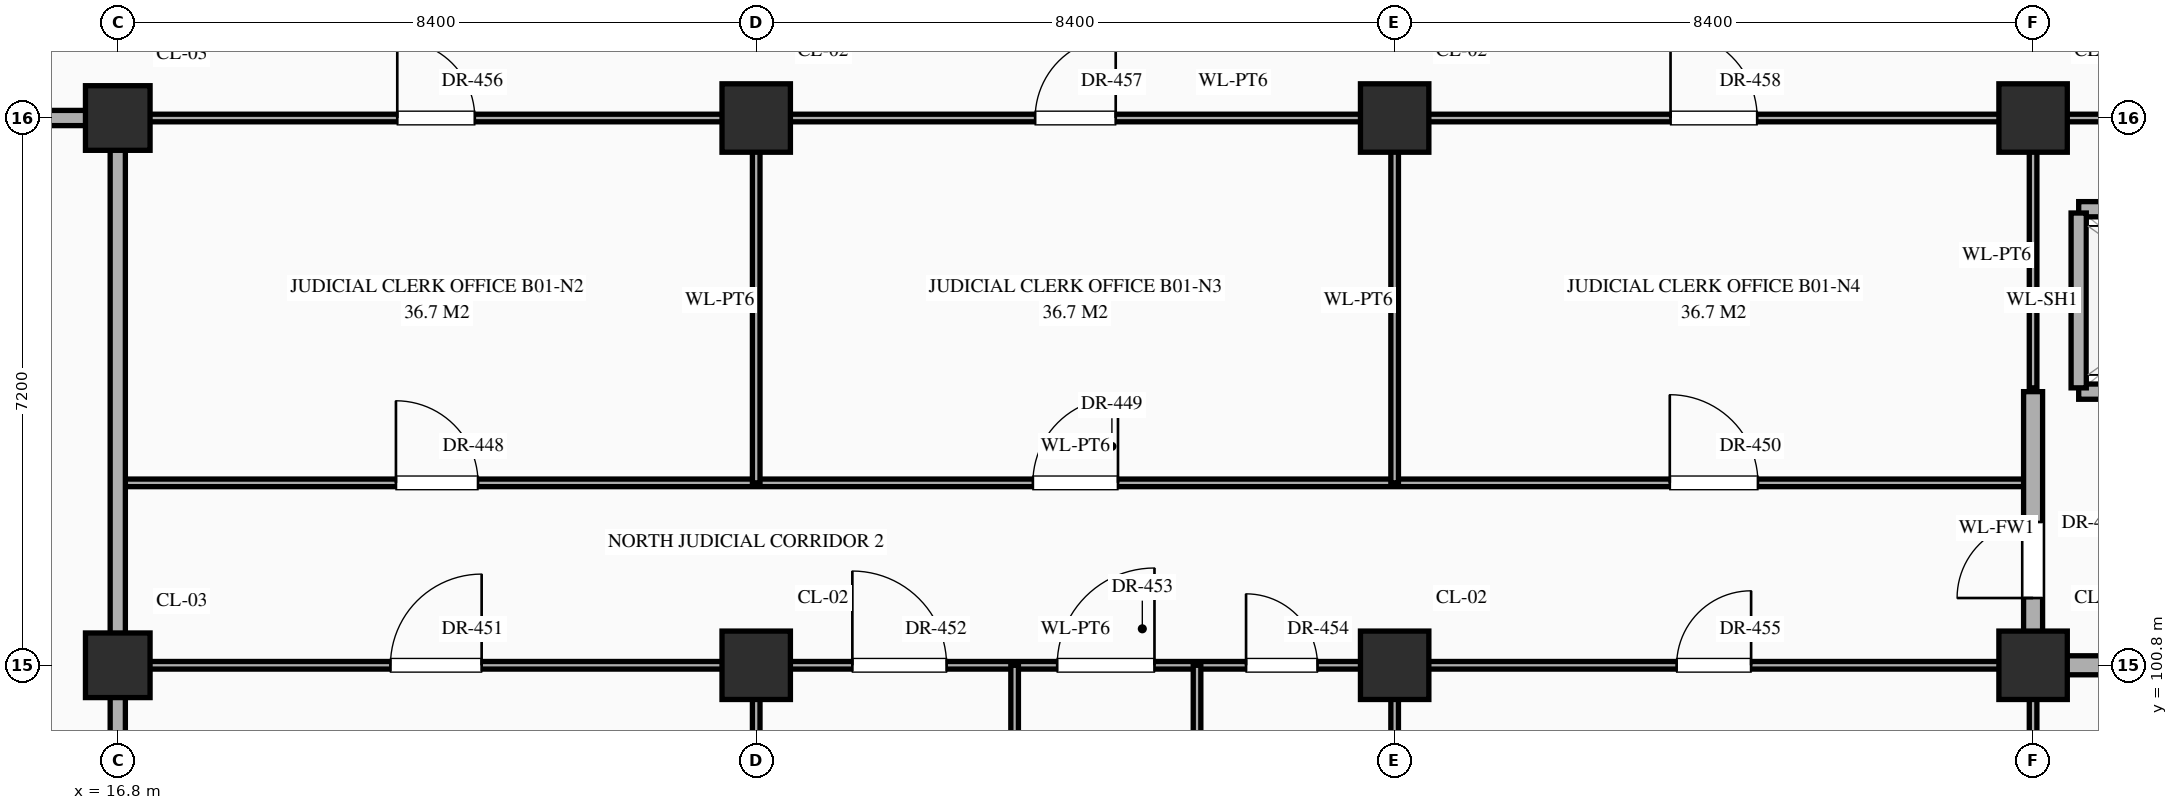
"""IFC4 building model, lengths in metres.
Left out: names, types, materials, properties, quantities, classifications, styles, units other than length and angle.
Written with IfcOpenShell. Run it as: python <this file> out.ifc"""

import sys

from ifc_helpers import new_model, si_unit, direction, frame, frame_2d, origin, origin_2d, place, context, subcontext, project, spatial, rectangle, extrude, element, fill, save


model = new_model("IFC4")
c1 = context("Model", 3, precision=1e-05, world=origin(), true_north=direction((0.0, 1.0)))
c2 = subcontext(c1, "Body", "Model", "MODEL_VIEW")
j1 = project(units=[si_unit("LENGTHUNIT", "METRE"), si_unit("PLANEANGLEUNIT", "RADIAN")], contexts=[c1])
p1 = place(None, origin())
s1 = spatial("IfcSite", under=j1, at=p1, CompositionType="ELEMENT")
p2 = place(p1, origin())
s2 = spatial("IfcBuilding", under=s1, at=p2, CompositionType="ELEMENT")
p3 = place(p2, frame((0.0, 0.0, -5.4)))
s3 = spatial("IfcBuildingStorey", under=s2, at=p3, CompositionType="ELEMENT", Elevation=-5.4)
for number, where, z_axis, x_axis in (
    (1, (16.8, 100.8, 0.0), (0.0, 0.0, 1.0), (1.0, 0.0, 0.0)),
    (2, (16.8, 108.0, 0.0), (0.0, 0.0, 1.0), (1.0, 0.0, 0.0)),
):
    element("IfcColumn", number, at=place(p3, frame(where, z_axis=z_axis, x_axis=x_axis)), inside=s3, PredefinedType="COLUMN", context=c2, shape_type="SweptSolid", body=[
        extrude(rectangle(XDim=0.85, YDim=0.85, at=origin_2d()), origin(), (0.0, 0.0, 1.0), 5.4),
    ])
for number, where, z_axis, x_axis in (
    (3, (25.2, 100.8, 0.0), (0.0, 0.0, 1.0), (1.0, 0.0, 0.0)),
    (4, (25.2, 108.0, 0.0), (0.0, 0.0, 1.0), (1.0, 0.0, 0.0)),
    (5, (33.6, 100.8, 0.0), (0.0, 0.0, 1.0), (1.0, 0.0, 0.0)),
    (6, (33.6, 108.0, 0.0), (0.0, 0.0, 1.0), (1.0, 0.0, 0.0)),
    (7, (42.0, 100.8, 0.0), (0.0, 0.0, 1.0), (1.0, 0.0, 0.0)),
    (8, (42.0, 108.0, 0.0), (0.0, 0.0, 1.0), (1.0, 0.0, 0.0)),
):
    element("IfcColumn", number, at=place(p3, frame(where, z_axis=z_axis, x_axis=x_axis)), inside=s3, PredefinedType="COLUMN", context=c2, shape_type="SweptSolid", body=[
        extrude(rectangle(XDim=0.9, YDim=0.9, at=origin_2d()), origin(), (0.0, 0.0, 1.0), 5.4),
    ])
p4 = place(p3, frame((16.8, 100.8, 0.0), z_axis=(0.0, 0.0, 1.0), x_axis=(1.0, 0.0, 0.0)))
e9 = element("IfcWall", 9, at=p4, inside=s3, PredefinedType="STANDARD", context=c2, shape_type="SweptSolid", body=[
    extrude(rectangle(XDim=25.2, YDim=0.1, at=frame_2d((12.6, 0.0))), origin(), (0.0, 0.0, 1.0), 4.25),
])
p5 = place(p4, frame((3.587, 0.0, 0.0)))
e10 = element("IfcOpeningElement", 10, at=p5, cuts=e9, PredefinedType="OPENING", context=c2, shape_type="SweptSolid", body=[
    extrude(rectangle(XDim=1.2, YDim=2.35, at=frame_2d((0.6, 1.175))), frame((0.0, 0.062, 0.0), z_axis=(0.0, -1.0, 0.0), x_axis=(1.0, 0.0, 0.0)), (0.0, 0.0, 1.0), 0.124),
])
p6 = place(p4, frame((9.665, 0.0, 0.0)))
e11 = element("IfcOpeningElement", 11, at=p6, cuts=e9, PredefinedType="OPENING", context=c2, shape_type="SweptSolid", body=[
    extrude(rectangle(XDim=1.24, YDim=2.3, at=frame_2d((0.62, 1.15))), frame((0.0, 0.062, 0.0), z_axis=(0.0, -1.0, 0.0), x_axis=(1.0, 0.0, 0.0)), (0.0, 0.0, 1.0), 0.124),
])
p7 = place(p4, frame((12.36, 0.0, 0.0)))
e12 = element("IfcOpeningElement", 12, at=p7, cuts=e9, PredefinedType="OPENING", context=c2, shape_type="SweptSolid", body=[
    extrude(rectangle(XDim=1.28, YDim=2.35, at=frame_2d((0.64, 1.175))), frame((0.0, 0.062, 0.0), z_axis=(0.0, -1.0, 0.0), x_axis=(1.0, 0.0, 0.0)), (0.0, 0.0, 1.0), 0.124),
])
p8 = place(p4, frame((14.845, 0.0, 0.0)))
e13 = element("IfcOpeningElement", 13, at=p8, cuts=e9, PredefinedType="OPENING", context=c2, shape_type="SweptSolid", body=[
    extrude(rectangle(XDim=0.94, YDim=2.3, at=frame_2d((0.47, 1.15))), frame((0.0, 0.062, 0.0), z_axis=(0.0, -1.0, 0.0), x_axis=(1.0, 0.0, 0.0)), (0.0, 0.0, 1.0), 0.124),
])
p9 = place(p4, frame((20.51, 0.0, 0.0)))
e14 = element("IfcOpeningElement", 14, at=p9, cuts=e9, PredefinedType="OPENING", context=c2, shape_type="SweptSolid", body=[
    extrude(rectangle(XDim=0.98, YDim=2.35, at=frame_2d((0.49, 1.175))), frame((0.0, 0.062, 0.0), z_axis=(0.0, -1.0, 0.0), x_axis=(1.0, 0.0, 0.0)), (0.0, 0.0, 1.0), 0.124),
])
p10 = place(p3, frame((42.0, 100.8, 0.0), z_axis=(0.0, 0.0, 1.0), x_axis=(1.0, 0.0, 0.0)))
e15 = element("IfcWall", 15, at=p10, inside=s3, PredefinedType="STANDARD", context=c2, shape_type="SweptSolid", body=[
    extrude(rectangle(XDim=4.2, YDim=0.25, at=frame_2d((2.1, 0.0))), origin(), (0.0, 0.0, 1.0), 4.25),
])
p11 = place(p3, frame((16.8, 103.2, 0.0), z_axis=(0.0, 0.0, 1.0), x_axis=(1.0, 0.0, 0.0)))
e16 = element("IfcWall", 16, at=p11, inside=s3, PredefinedType="STANDARD", context=c2, shape_type="SweptSolid", body=[
    extrude(rectangle(XDim=25.2, YDim=0.1, at=frame_2d((12.6, 0.0))), origin(), (0.0, 0.0, 1.0), 5.1),
])
p12 = place(p11, frame((3.66, 0.0, 0.0)))
e17 = element("IfcOpeningElement", 17, at=p12, cuts=e16, PredefinedType="OPENING", context=c2, shape_type="SweptSolid", body=[
    extrude(rectangle(XDim=1.08, YDim=2.25, at=frame_2d((0.54, 1.125))), frame((0.0, 0.062, 0.0), z_axis=(0.0, -1.0, 0.0), x_axis=(1.0, 0.0, 0.0)), (0.0, 0.0, 1.0), 0.124),
])
p13 = place(p11, frame((12.04, 0.0, 0.0)))
e18 = element("IfcOpeningElement", 18, at=p13, cuts=e16, PredefinedType="OPENING", context=c2, shape_type="SweptSolid", body=[
    extrude(rectangle(XDim=1.12, YDim=2.25, at=frame_2d((0.56, 1.125))), frame((0.0, 0.062, 0.0), z_axis=(0.0, -1.0, 0.0), x_axis=(1.0, 0.0, 0.0)), (0.0, 0.0, 1.0), 0.124),
])
p14 = place(p11, frame((20.42, 0.0, 0.0)))
e19 = element("IfcOpeningElement", 19, at=p14, cuts=e16, PredefinedType="OPENING", context=c2, shape_type="SweptSolid", body=[
    extrude(rectangle(XDim=1.16, YDim=2.3, at=frame_2d((0.58, 1.15))), frame((0.0, 0.062, 0.0), z_axis=(0.0, -1.0, 0.0), x_axis=(1.0, 0.0, 0.0)), (0.0, 0.0, 1.0), 0.124),
])
p15 = place(p3, frame((42.6, 104.4, 0.0), z_axis=(0.0, 0.0, 1.0), x_axis=(1.0, 0.0, 0.0)))
e20 = element("IfcWall", 20, at=p15, inside=s3, PredefinedType="STANDARD", context=c2, shape_type="SweptSolid", body=[
    extrude(rectangle(XDim=3.0, YDim=0.2, at=frame_2d((1.5, 0.0))), origin(), (0.0, 0.0, 1.0), 5.1),
])
p16 = place(p15, frame((0.9, 0.0, 0.0)))
e21 = element("IfcOpeningElement", 21, at=p16, cuts=e20, PredefinedType="OPENING", context=c2, shape_type="SweptSolid", body=[
    extrude(rectangle(XDim=1.2, YDim=2.15, at=frame_2d((0.6, 1.075))), frame((0.0, 0.112, 0.0), z_axis=(0.0, -1.0, 0.0), x_axis=(1.0, 0.0, 0.0)), (0.0, 0.0, 1.0), 0.224),
])
p17 = place(p3, frame((42.6, 106.8, 0.0), z_axis=(0.0, 0.0, 1.0), x_axis=(1.0, 0.0, 0.0)))
e22 = element("IfcWall", 22, at=p17, inside=s3, PredefinedType="STANDARD", context=c2, shape_type="SweptSolid", body=[
    extrude(rectangle(XDim=3.0, YDim=0.2, at=frame_2d((1.5, 0.0))), origin(), (0.0, 0.0, 1.0), 5.1),
])
p18 = place(p3, frame((10.2, 108.0, 0.0), z_axis=(0.0, 0.0, 1.0), x_axis=(1.0, 0.0, 0.0)))
e23 = element("IfcWall", 23, at=p18, inside=s3, PredefinedType="STANDARD", context=c2, shape_type="SweptSolid", body=[
    extrude(rectangle(XDim=6.6, YDim=0.2, at=frame_2d((3.3, 0.0))), origin(), (0.0, 0.0, 1.0), 4.13),
])
p19 = place(p3, frame((16.8, 108.0, 0.0), z_axis=(0.0, 0.0, 1.0), x_axis=(1.0, 0.0, 0.0)))
e24 = element("IfcWall", 24, at=p19, inside=s3, PredefinedType="STANDARD", context=c2, shape_type="SweptSolid", body=[
    extrude(rectangle(XDim=25.2, YDim=0.1, at=frame_2d((12.6, 0.0))), origin(), (0.0, 0.0, 1.0), 4.13),
])
p20 = place(p19, frame((3.677, 0.0, 0.0)))
e25 = element("IfcOpeningElement", 25, at=p20, cuts=e24, PredefinedType="OPENING", context=c2, shape_type="SweptSolid", body=[
    extrude(rectangle(XDim=1.02, YDim=2.4, at=frame_2d((0.51, 1.2))), frame((0.0, 0.062, 0.0), z_axis=(0.0, -1.0, 0.0), x_axis=(1.0, 0.0, 0.0)), (0.0, 0.0, 1.0), 0.124),
])
p21 = place(p19, frame((12.07, 0.0, 0.0)))
e26 = element("IfcOpeningElement", 26, at=p21, cuts=e24, PredefinedType="OPENING", context=c2, shape_type="SweptSolid", body=[
    extrude(rectangle(XDim=1.06, YDim=2.4, at=frame_2d((0.53, 1.2))), frame((0.0, 0.062, 0.0), z_axis=(0.0, -1.0, 0.0), x_axis=(1.0, 0.0, 0.0)), (0.0, 0.0, 1.0), 0.124),
])
p22 = place(p19, frame((20.43, 0.0, 0.0)))
e27 = element("IfcOpeningElement", 27, at=p22, cuts=e24, PredefinedType="OPENING", context=c2, shape_type="SweptSolid", body=[
    extrude(rectangle(XDim=1.14, YDim=2.4, at=frame_2d((0.57, 1.2))), frame((0.0, 0.062, 0.0), z_axis=(0.0, -1.0, 0.0), x_axis=(1.0, 0.0, 0.0)), (0.0, 0.0, 1.0), 0.124),
])
p23 = place(p3, frame((42.05, 108.0, 0.0), z_axis=(0.0, 0.0, 1.0), x_axis=(1.0, 0.0, 0.0)))
e28 = element("IfcWall", 28, at=p23, inside=s3, PredefinedType="STANDARD", context=c2, shape_type="SweptSolid", body=[
    extrude(rectangle(XDim=4.1, YDim=0.1, at=frame_2d((2.05, 0.0))), origin(), (0.0, 0.0, 1.0), 4.13),
])
p24 = place(p3, frame((16.8, 91.2, 0.0), z_axis=(0.0, 0.0, 1.0), x_axis=(0.0, 1.0, 0.0)))
e29 = element("IfcWall", 29, at=p24, inside=s3, PredefinedType="STANDARD", context=c2, shape_type="SweptSolid", body=[
    extrude(rectangle(XDim=16.8, YDim=0.2, at=frame_2d((8.4, 0.0))), origin(), (0.0, 0.0, 1.0), 4.35),
])
for number, where, z_axis, x_axis in (
    (30, (25.2, 96.0, 0.0), (0.0, 0.0, 1.0), (0.0, 1.0, 0.0)),
    (31, (25.2, 103.2, 0.0), (0.0, 0.0, 1.0), (0.0, 1.0, 0.0)),
):
    element("IfcWall", number, at=place(p3, frame(where, z_axis=z_axis, x_axis=x_axis)), inside=s3, PredefinedType="STANDARD", context=c2, shape_type="SweptSolid", body=[
        extrude(rectangle(XDim=4.8, YDim=0.1, at=frame_2d((2.4, 0.0))), origin(), (0.0, 0.0, 1.0), 4.35),
    ])
p25 = place(p3, frame((28.6, 96.0, 0.0), z_axis=(0.0, 0.0, 1.0), x_axis=(0.0, 1.0, 0.0)))
e32 = element("IfcWall", 32, at=p25, inside=s3, PredefinedType="STANDARD", context=c2, shape_type="SweptSolid", body=[
    extrude(rectangle(XDim=4.8, YDim=0.1, at=frame_2d((2.4, 0.0))), origin(), (0.0, 0.0, 1.0), 5.1),
])
p26 = place(p25, frame((1.91, 0.0, 0.0)))
e33 = element("IfcOpeningElement", 33, at=p26, cuts=e32, PredefinedType="OPENING", context=c2, shape_type="SweptSolid", body=[
    extrude(rectangle(XDim=0.98, YDim=2.35, at=frame_2d((0.49, 1.175))), frame((0.0, 0.062, 0.0), z_axis=(0.0, -1.0, 0.0), x_axis=(1.0, 0.0, 0.0)), (0.0, 0.0, 1.0), 0.124),
])
p27 = place(p3, frame((31.0, 96.0, 0.0), z_axis=(0.0, 0.0, 1.0), x_axis=(0.0, 1.0, 0.0)))
e34 = element("IfcWall", 34, at=p27, inside=s3, PredefinedType="STANDARD", context=c2, shape_type="SweptSolid", body=[
    extrude(rectangle(XDim=4.8, YDim=0.1, at=frame_2d((2.4, 0.0))), origin(), (0.0, 0.0, 1.0), 5.1),
])
p28 = place(p27, frame((1.89, 0.0, 0.0)))
e35 = element("IfcOpeningElement", 35, at=p28, cuts=e34, PredefinedType="OPENING", context=c2, shape_type="SweptSolid", body=[
    extrude(rectangle(XDim=1.02, YDim=2.4, at=frame_2d((0.51, 1.2))), frame((0.0, 0.062, 0.0), z_axis=(0.0, -1.0, 0.0), x_axis=(1.0, 0.0, 0.0)), (0.0, 0.0, 1.0), 0.124),
])
for number, where, z_axis, x_axis in (
    (36, (33.6, 96.0, 0.0), (0.0, 0.0, 1.0), (0.0, 1.0, 0.0)),
    (37, (33.6, 103.2, 0.0), (0.0, 0.0, 1.0), (0.0, 1.0, 0.0)),
    (38, (42.0, 96.0, 0.0), (0.0, 0.0, 1.0), (0.0, 1.0, 0.0)),
):
    element("IfcWall", number, at=place(p3, frame(where, z_axis=z_axis, x_axis=x_axis)), inside=s3, PredefinedType="STANDARD", context=c2, shape_type="SweptSolid", body=[
        extrude(rectangle(XDim=4.8, YDim=0.1, at=frame_2d((2.4, 0.0))), origin(), (0.0, 0.0, 1.0), 4.35),
    ])
p29 = place(p3, frame((42.0, 100.8, 0.0), z_axis=(0.0, 0.0, 1.0), x_axis=(0.0, 1.0, 0.0)))
e39 = element("IfcWall", 39, at=p29, inside=s3, PredefinedType="STANDARD", context=c2, shape_type="SweptSolid", body=[
    extrude(rectangle(XDim=3.6, YDim=0.25, at=frame_2d((1.8, 0.0))), origin(), (0.0, 0.0, 1.0), 4.35),
])
p30 = place(p29, frame((0.885, 0.0, 0.0)))
e40 = element("IfcOpeningElement", 40, at=p30, cuts=e39, PredefinedType="OPENING", context=c2, shape_type="SweptSolid", body=[
    extrude(rectangle(XDim=1.0, YDim=2.2, at=frame_2d((0.5, 1.1))), frame((0.0, 0.137, 0.0), z_axis=(0.0, -1.0, 0.0), x_axis=(1.0, 0.0, 0.0)), (0.0, 0.0, 1.0), 0.274),
])
p31 = place(p3, frame((42.0, 104.45, 0.0), z_axis=(0.0, 0.0, 1.0), x_axis=(0.0, 1.0, 0.0)))
e41 = element("IfcWall", 41, at=p31, inside=s3, PredefinedType="STANDARD", context=c2, shape_type="SweptSolid", body=[
    extrude(rectangle(XDim=3.5, YDim=0.1, at=frame_2d((1.75, 0.0))), origin(), (0.0, 0.0, 1.0), 4.35),
])
p32 = place(p3, frame((42.6, 104.45, 0.0), z_axis=(0.0, 0.0, 1.0), x_axis=(0.0, 1.0, 0.0)))
e42 = element("IfcWall", 42, at=p32, inside=s3, PredefinedType="STANDARD", context=c2, shape_type="SweptSolid", body=[
    extrude(rectangle(XDim=2.3, YDim=0.2, at=frame_2d((1.15, 0.0))), origin(), (0.0, 0.0, 1.0), 5.1),
])
p33 = place(p30, origin())
e43 = element("IfcDoor", 43, at=p33, inside=s3, OperationType="SINGLE_SWING_LEFT", PredefinedType="DOOR", context=c2, shape_type="SweptSolid", body=[
    extrude(rectangle(XDim=1.0, YDim=2.2, at=frame_2d((0.5, 1.1))), frame((0.0, 0.025, 0.0), z_axis=(0.0, -1.0, 0.0), x_axis=(1.0, 0.0, 0.0)), (0.0, 0.0, 1.0), 0.05),
])
fill(e40, e43)
p34 = place(p12, origin())
e44 = element("IfcDoor", 44, at=p34, inside=s3, OperationType="SINGLE_SWING_LEFT", PredefinedType="DOOR", context=c2, shape_type="SweptSolid", body=[
    extrude(rectangle(XDim=1.08, YDim=2.25, at=frame_2d((0.54, 1.125))), frame((0.0, 0.025, 0.0), z_axis=(0.0, -1.0, 0.0), x_axis=(1.0, 0.0, 0.0)), (0.0, 0.0, 1.0), 0.05),
])
fill(e17, e44)
p35 = place(p13, origin())
e45 = element("IfcDoor", 45, at=p35, inside=s3, OperationType="SINGLE_SWING_RIGHT", PredefinedType="DOOR", context=c2, shape_type="SweptSolid", body=[
    extrude(rectangle(XDim=1.12, YDim=2.25, at=frame_2d((0.56, 1.125))), frame((0.0, 0.025, 0.0), z_axis=(0.0, -1.0, 0.0), x_axis=(1.0, 0.0, 0.0)), (0.0, 0.0, 1.0), 0.05),
])
fill(e18, e45)
p36 = place(p14, origin())
e46 = element("IfcDoor", 46, at=p36, inside=s3, OperationType="SINGLE_SWING_LEFT", PredefinedType="DOOR", context=c2, shape_type="SweptSolid", body=[
    extrude(rectangle(XDim=1.16, YDim=2.3, at=frame_2d((0.58, 1.15))), frame((0.0, 0.025, 0.0), z_axis=(0.0, -1.0, 0.0), x_axis=(1.0, 0.0, 0.0)), (0.0, 0.0, 1.0), 0.05),
])
fill(e19, e46)
p37 = place(p5, origin())
e47 = element("IfcDoor", 47, at=p37, inside=s3, OperationType="SINGLE_SWING_RIGHT", PredefinedType="DOOR", context=c2, shape_type="SweptSolid", body=[
    extrude(rectangle(XDim=1.2, YDim=2.35, at=frame_2d((0.6, 1.175))), frame((0.0, 0.025, 0.0), z_axis=(0.0, -1.0, 0.0), x_axis=(1.0, 0.0, 0.0)), (0.0, 0.0, 1.0), 0.05),
])
fill(e10, e47)
p38 = place(p6, origin())
e48 = element("IfcDoor", 48, at=p38, inside=s3, OperationType="SINGLE_SWING_LEFT", PredefinedType="DOOR", context=c2, shape_type="SweptSolid", body=[
    extrude(rectangle(XDim=1.24, YDim=2.3, at=frame_2d((0.62, 1.15))), frame((0.0, 0.025, 0.0), z_axis=(0.0, -1.0, 0.0), x_axis=(1.0, 0.0, 0.0)), (0.0, 0.0, 1.0), 0.05),
])
fill(e11, e48)
p39 = place(p7, origin())
e49 = element("IfcDoor", 49, at=p39, inside=s3, OperationType="SINGLE_SWING_RIGHT", PredefinedType="DOOR", context=c2, shape_type="SweptSolid", body=[
    extrude(rectangle(XDim=1.28, YDim=2.35, at=frame_2d((0.64, 1.175))), frame((0.0, 0.025, 0.0), z_axis=(0.0, -1.0, 0.0), x_axis=(1.0, 0.0, 0.0)), (0.0, 0.0, 1.0), 0.05),
])
fill(e12, e49)
p40 = place(p8, origin())
e50 = element("IfcDoor", 50, at=p40, inside=s3, OperationType="SINGLE_SWING_LEFT", PredefinedType="DOOR", context=c2, shape_type="SweptSolid", body=[
    extrude(rectangle(XDim=0.94, YDim=2.3, at=frame_2d((0.47, 1.15))), frame((0.0, 0.025, 0.0), z_axis=(0.0, -1.0, 0.0), x_axis=(1.0, 0.0, 0.0)), (0.0, 0.0, 1.0), 0.05),
])
fill(e13, e50)
p41 = place(p9, origin())
e51 = element("IfcDoor", 51, at=p41, inside=s3, OperationType="SINGLE_SWING_RIGHT", PredefinedType="DOOR", context=c2, shape_type="SweptSolid", body=[
    extrude(rectangle(XDim=0.98, YDim=2.35, at=frame_2d((0.49, 1.175))), frame((0.0, 0.025, 0.0), z_axis=(0.0, -1.0, 0.0), x_axis=(1.0, 0.0, 0.0)), (0.0, 0.0, 1.0), 0.05),
])
fill(e14, e51)
p42 = place(p20, origin())
e52 = element("IfcDoor", 52, at=p42, inside=s3, OperationType="SINGLE_SWING_LEFT", PredefinedType="DOOR", context=c2, shape_type="SweptSolid", body=[
    extrude(rectangle(XDim=1.02, YDim=2.4, at=frame_2d((0.51, 1.2))), frame((0.0, 0.025, 0.0), z_axis=(0.0, -1.0, 0.0), x_axis=(1.0, 0.0, 0.0)), (0.0, 0.0, 1.0), 0.05),
])
fill(e25, e52)
p43 = place(p21, origin())
e53 = element("IfcDoor", 53, at=p43, inside=s3, OperationType="SINGLE_SWING_RIGHT", PredefinedType="DOOR", context=c2, shape_type="SweptSolid", body=[
    extrude(rectangle(XDim=1.06, YDim=2.4, at=frame_2d((0.53, 1.2))), frame((0.0, 0.025, 0.0), z_axis=(0.0, -1.0, 0.0), x_axis=(1.0, 0.0, 0.0)), (0.0, 0.0, 1.0), 0.05),
])
fill(e26, e53)
p44 = place(p22, origin())
e54 = element("IfcDoor", 54, at=p44, inside=s3, OperationType="SINGLE_SWING_LEFT", PredefinedType="DOOR", context=c2, shape_type="SweptSolid", body=[
    extrude(rectangle(XDim=1.14, YDim=2.4, at=frame_2d((0.57, 1.2))), frame((0.0, 0.025, 0.0), z_axis=(0.0, -1.0, 0.0), x_axis=(1.0, 0.0, 0.0)), (0.0, 0.0, 1.0), 0.05),
])
fill(e27, e54)
save(model, sys.argv[1])
